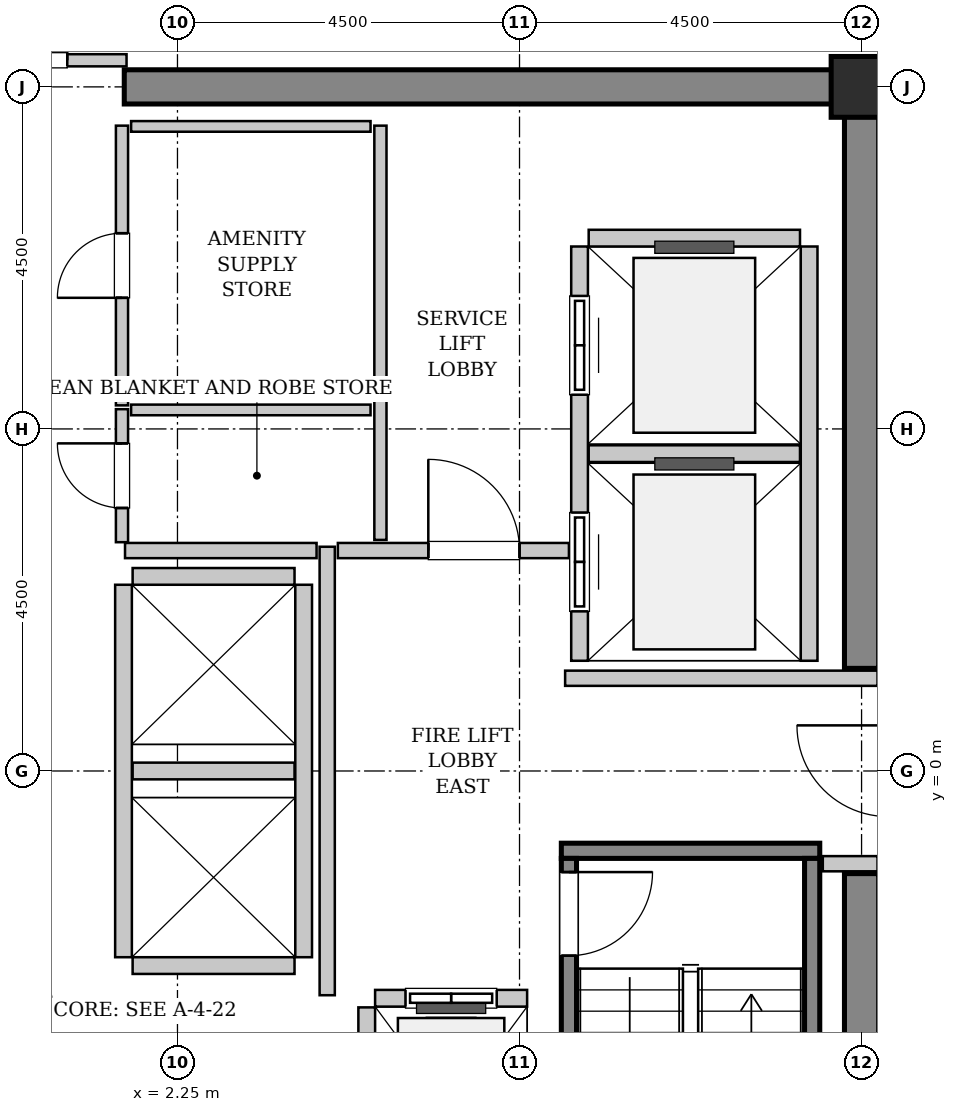
"""IFC4 building model, lengths in metres.
Left out: names, types, materials, properties, quantities, classifications, styles, units other than length and angle.
Written with IfcOpenShell. Run it as: python <this file> out.ifc"""

import sys

from ifc_helpers import new_model, si_unit, direction, frame, frame_2d, origin, origin_2d, place, context, subcontext, project, spatial, rectangle, hollow_rectangle, extrude, source, transform, mapped, element, fill, save


model = new_model("IFC4")
c1 = context("Model", 3, precision=1e-05, world=origin(), true_north=direction((0.0, 1.0)))
c2 = subcontext(c1, "Body", "Model", "MODEL_VIEW")
j1 = project(units=[si_unit("LENGTHUNIT", "METRE"), si_unit("PLANEANGLEUNIT", "RADIAN")], contexts=[c1])
p1 = place(None, origin())
s1 = spatial("IfcSite", under=j1, at=p1, CompositionType="ELEMENT")
p2 = place(p1, origin())
s2 = spatial("IfcBuilding", under=s1, at=p2, CompositionType="ELEMENT")
p3 = place(p2, frame((0.0, 0.0, 279.8)))
s3 = spatial("IfcBuildingStorey", under=s2, at=p3, CompositionType="ELEMENT", Elevation=279.8)
m1 = source(origin(), c2, "Body", "SweptSolid", [
    extrude(rectangle(XDim=9.925, YDim=0.45, at=frame_2d((4.962, 0.0))), origin(), (0.0, 0.0, 1.0), 3.8),
])
p4 = place(p3, frame((1.55, 9.0, 0.0), z_axis=(0.0, 0.0, 1.0), x_axis=(1.0, 0.0, 0.0)))
e1 = element("IfcWall", 1, at=p4, inside=s3, PredefinedType="SHEAR", context=c2, shape_type="MappedRepresentation", body=[
    mapped(m1, transform((0.0, 0.0, 0.0), x_axis=(1.0, 0.0, 0.0), y_axis=(0.0, 1.0, 0.0), z_axis=(0.0, 0.0, 1.0), scale=1.0)),
])
m2 = source(origin(), c2, "Body", "SweptSolid", [
    extrude(rectangle(XDim=7.425, YDim=0.45, at=frame_2d((3.712, 0.0))), origin(), (0.0, 0.0, 1.0), 3.8),
])
for number, where, z_axis, x_axis in (
    (2, (11.25, -8.775, 0.0), (0.0, 0.0, 1.0), (0.0, 1.0, 0.0)),
    (3, (11.25, 1.35, 0.0), (0.0, 0.0, 1.0), (0.0, 1.0, 0.0)),
):
    element("IfcWall", number, at=place(p3, frame(where, z_axis=z_axis, x_axis=x_axis)), inside=s3, PredefinedType="SHEAR", context=c2, shape_type="MappedRepresentation", body=[
        mapped(m2, transform((0.0, 0.0, 0.0), x_axis=(1.0, 0.0, 0.0), y_axis=(0.0, 1.0, 0.0), z_axis=(0.0, 0.0, 1.0), scale=1.0)),
    ])
m3 = source(origin(), c2, "Body", "SweptSolid", [
    extrude(hollow_rectangle(XDim=0.8, YDim=0.8, WallThickness=0.04, InnerFilletRadius=0.04, OuterFilletRadius=0.08, at=origin_2d()), origin(), (0.0, 0.0, 1.0), 3.8),
])
p5 = place(p3, frame((11.25, 9.0, 0.0), z_axis=(0.0, 0.0, 1.0), x_axis=(1.0, 0.0, 0.0)))
e4 = element("IfcColumn", 4, at=p5, inside=s3, PredefinedType="COLUMN", context=c2, shape_type="MappedRepresentation", body=[
    mapped(m3, transform((0.0, 0.0, 0.0), x_axis=(1.0, 0.0, 0.0), y_axis=(0.0, 1.0, 0.0), z_axis=(0.0, 0.0, 1.0), scale=1.0)),
])
m4 = source(origin(), c2, "Body", "SweptSolid", [
    extrude(rectangle(XDim=3.4, YDim=0.2, at=frame_2d((1.7, 0.0))), origin(), (0.0, 0.0, 1.0), 3.8),
])
p6 = place(p3, frame((7.3, -1.05, 0.0), z_axis=(0.0, 0.0, 1.0), x_axis=(1.0, 0.0, 0.0)))
e5 = element("IfcWall", 5, at=p6, inside=s3, PredefinedType="SOLIDWALL", context=c2, shape_type="MappedRepresentation", body=[
    mapped(m4, transform((0.0, 0.0, 0.0), x_axis=(1.0, 0.0, 0.0), y_axis=(0.0, 1.0, 0.0), z_axis=(0.0, 0.0, 1.0), scale=1.0)),
])
m5 = source(origin(), c2, "Body", "SweptSolid", [
    extrude(rectangle(XDim=7.1, YDim=0.2, at=frame_2d((3.55, 0.0))), origin(), (0.0, 0.0, 1.0), 3.8),
])
p7 = place(p3, frame((7.4, -1.15, 0.0), z_axis=(0.0, 0.0, 1.0), x_axis=(0.0, -1.0, 0.0)))
e6 = element("IfcWall", 6, at=p7, inside=s3, PredefinedType="SOLIDWALL", context=c2, shape_type="MappedRepresentation", body=[
    mapped(m5, transform((0.0, 0.0, 0.0), x_axis=(1.0, 0.0, 0.0), y_axis=(0.0, 1.0, 0.0), z_axis=(0.0, 0.0, 1.0), scale=1.0)),
])
p8 = place(p7, frame((0.18, 0.0, 0.0)))
e7 = element("IfcOpeningElement", 7, at=p8, cuts=e6, PredefinedType="OPENING", context=c2, shape_type="SweptSolid", body=[
    extrude(rectangle(XDim=1.1, YDim=2.15, at=frame_2d((0.55, 1.075))), frame((0.0, 0.11, 0.0), z_axis=(0.0, -1.0, 0.0), x_axis=(1.0, 0.0, 0.0)), (0.0, 0.0, 1.0), 0.22),
])
p9 = place(p3, frame((10.6, -1.15, 0.0), z_axis=(0.0, 0.0, 1.0), x_axis=(0.0, -1.0, 0.0)))
e8 = element("IfcWall", 8, at=p9, inside=s3, PredefinedType="SOLIDWALL", context=c2, shape_type="MappedRepresentation", body=[
    mapped(m5, transform((0.0, 0.0, 0.0), x_axis=(1.0, 0.0, 0.0), y_axis=(0.0, 1.0, 0.0), z_axis=(0.0, 0.0, 1.0), scale=1.0)),
])
m6 = source(origin(), c2, "Body", "SweptSolid", [
    extrude(rectangle(XDim=2.0, YDim=0.22, at=frame_2d((1.0, 0.0))), origin(), (0.0, 0.0, 1.0), 3.535),
])
p10 = place(p3, frame((6.85, -2.99, 0.0), z_axis=(0.0, 0.0, 1.0), x_axis=(-1.0, 0.0, 0.0)))
e9 = element("IfcWall", 9, at=p10, inside=s3, PredefinedType="SOLIDWALL", context=c2, shape_type="MappedRepresentation", body=[
    mapped(m6, transform((0.0, 0.0, 0.0), x_axis=(1.0, 0.0, 0.0), y_axis=(0.0, 1.0, 0.0), z_axis=(0.0, 0.0, 1.0), scale=1.0)),
])
p11 = place(p10, frame((0.4, 0.0, 0.0)))
e10 = element("IfcOpeningElement", 10, at=p11, cuts=e9, PredefinedType="OPENING", context=c2, shape_type="SweptSolid", body=[
    extrude(rectangle(XDim=1.2, YDim=2.2, at=frame_2d((0.6, 1.1))), frame((0.0, 0.12, 0.0), z_axis=(0.0, -1.0, 0.0), x_axis=(1.0, 0.0, 0.0)), (0.0, 0.0, 1.0), 0.24),
])
m7 = source(origin(), c2, "Body", "SweptSolid", [
    extrude(rectangle(XDim=2.68, YDim=0.22, at=frame_2d((1.34, 0.0))), origin(), (0.0, 0.0, 1.0), 3.535),
])
p12 = place(p3, frame((4.74, -3.11, 0.0), z_axis=(0.0, 0.0, 1.0), x_axis=(0.0, -1.0, 0.0)))
e11 = element("IfcWall", 11, at=p12, inside=s3, PredefinedType="SOLIDWALL", context=c2, shape_type="MappedRepresentation", body=[
    mapped(m7, transform((0.0, 0.0, 0.0), x_axis=(1.0, 0.0, 0.0), y_axis=(0.0, 1.0, 0.0), z_axis=(0.0, 0.0, 1.0), scale=1.0)),
])
m8 = source(origin(), c2, "Body", "SweptSolid", [
    extrude(rectangle(XDim=5.45, YDim=0.22, at=frame_2d((2.725, 0.0))), origin(), (0.0, 0.0, 1.0), 3.535),
])
p13 = place(p3, frame((7.54, 6.9, 0.0), z_axis=(0.0, 0.0, 1.0), x_axis=(0.0, -1.0, 0.0)))
e12 = element("IfcWall", 12, at=p13, inside=s3, PredefinedType="SOLIDWALL", context=c2, shape_type="MappedRepresentation", body=[
    mapped(m8, transform((0.0, 0.0, 0.0), x_axis=(1.0, 0.0, 0.0), y_axis=(0.0, 1.0, 0.0), z_axis=(0.0, 0.0, 1.0), scale=1.0)),
])
p14 = place(p13, frame((3.5, 0.0, 0.0)))
e13 = element("IfcOpeningElement", 13, at=p14, cuts=e12, PredefinedType="OPENING", context=c2, shape_type="SweptSolid", body=[
    extrude(rectangle(XDim=1.3, YDim=2.3, at=frame_2d((0.65, 1.15))), frame((0.0, 0.12, 0.0), z_axis=(0.0, -1.0, 0.0), x_axis=(1.0, 0.0, 0.0)), (0.0, 0.0, 1.0), 0.24),
])
p15 = place(p13, frame((0.65, 0.0, 0.0)))
e14 = element("IfcOpeningElement", 14, at=p15, cuts=e12, PredefinedType="OPENING", context=c2, shape_type="SweptSolid", body=[
    extrude(rectangle(XDim=1.3, YDim=2.3, at=frame_2d((0.65, 1.15))), frame((0.0, 0.12, 0.0), z_axis=(0.0, -1.0, 0.0), x_axis=(1.0, 0.0, 0.0)), (0.0, 0.0, 1.0), 0.24),
])
p16 = place(p3, frame((10.56, 1.45, 0.0), z_axis=(0.0, 0.0, 1.0), x_axis=(0.0, 1.0, 0.0)))
e15 = element("IfcWall", 15, at=p16, inside=s3, PredefinedType="SOLIDWALL", context=c2, shape_type="MappedRepresentation", body=[
    mapped(m8, transform((0.0, 0.0, 0.0), x_axis=(1.0, 0.0, 0.0), y_axis=(0.0, 1.0, 0.0), z_axis=(0.0, 0.0, 1.0), scale=1.0)),
])
m9 = source(origin(), c2, "Body", "SweptSolid", [
    extrude(rectangle(XDim=2.78, YDim=0.22, at=frame_2d((1.39, 0.0))), origin(), (0.0, 0.0, 1.0), 3.535),
])
for number, where, z_axis, x_axis in (
    (16, (7.66, 4.175, 0.0), (0.0, 0.0, 1.0), (1.0, 0.0, 0.0)),
    (17, (10.44, 7.01, 0.0), (0.0, 0.0, 1.0), (-1.0, 0.0, 0.0)),
):
    element("IfcWall", number, at=place(p3, frame(where, z_axis=z_axis, x_axis=x_axis)), inside=s3, PredefinedType="SOLIDWALL", context=c2, shape_type="MappedRepresentation", body=[
        mapped(m9, transform((0.0, 0.0, 0.0), x_axis=(1.0, 0.0, 0.0), y_axis=(0.0, 1.0, 0.0), z_axis=(0.0, 0.0, 1.0), scale=1.0)),
    ])
m10 = source(origin(), c2, "Body", "SweptSolid", [
    extrude(rectangle(XDim=4.9, YDim=0.22, at=frame_2d((2.45, 0.0))), origin(), (0.0, 0.0, 1.0), 3.535),
])
for number, where, z_axis, x_axis in (
    (18, (1.54, 2.45, 0.0), (0.0, 0.0, 1.0), (0.0, -1.0, 0.0)),
    (19, (3.91, -2.45, 0.0), (0.0, 0.0, 1.0), (0.0, 1.0, 0.0)),
):
    element("IfcWall", number, at=place(p3, frame(where, z_axis=z_axis, x_axis=x_axis)), inside=s3, PredefinedType="SOLIDWALL", context=c2, shape_type="MappedRepresentation", body=[
        mapped(m10, transform((0.0, 0.0, 0.0), x_axis=(1.0, 0.0, 0.0), y_axis=(0.0, 1.0, 0.0), z_axis=(0.0, 0.0, 1.0), scale=1.0)),
    ])
m11 = source(origin(), c2, "Body", "SweptSolid", [
    extrude(rectangle(XDim=2.13, YDim=0.22, at=frame_2d((1.065, 0.0))), origin(), (0.0, 0.0, 1.0), 3.535),
])
for number, where, z_axis, x_axis in (
    (20, (1.66, -2.56, 0.0), (0.0, 0.0, 1.0), (1.0, 0.0, 0.0)),
    (21, (1.66, 0.0, 0.0), (0.0, 0.0, 1.0), (1.0, 0.0, 0.0)),
    (22, (3.79, 2.56, 0.0), (0.0, 0.0, 1.0), (-1.0, 0.0, 0.0)),
):
    element("IfcWall", number, at=place(p3, frame(where, z_axis=z_axis, x_axis=x_axis)), inside=s3, PredefinedType="SOLIDWALL", context=c2, shape_type="MappedRepresentation", body=[
        mapped(m11, transform((0.0, 0.0, 0.0), x_axis=(1.0, 0.0, 0.0), y_axis=(0.0, 1.0, 0.0), z_axis=(0.0, 0.0, 1.0), scale=1.0)),
    ])
m12 = source(origin(), c2, "Body", "SweptSolid", [
    extrude(rectangle(XDim=5.9, YDim=0.2, at=frame_2d((2.95, 0.0))), origin(), (0.0, 0.0, 1.0), 3.535),
])
p17 = place(p3, frame((4.22, -2.95, 0.0), z_axis=(0.0, 0.0, 1.0), x_axis=(0.0, 1.0, 0.0)))
e23 = element("IfcWall", 23, at=p17, inside=s3, PredefinedType="PARTITIONING", context=c2, shape_type="MappedRepresentation", body=[
    mapped(m12, transform((0.0, 0.0, 0.0), x_axis=(1.0, 0.0, 0.0), y_axis=(0.0, 1.0, 0.0), z_axis=(0.0, 0.0, 1.0), scale=1.0)),
])
m13 = source(origin(), c2, "Body", "SweptSolid", [
    extrude(rectangle(XDim=2.52, YDim=0.2, at=frame_2d((1.26, 0.0))), origin(), (0.0, 0.0, 1.0), 3.535),
])
p18 = place(p3, frame((1.56, 2.9, 0.0), z_axis=(0.0, 0.0, 1.0), x_axis=(1.0, 0.0, 0.0)))
e24 = element("IfcWall", 24, at=p18, inside=s3, PredefinedType="PARTITIONING", context=c2, shape_type="MappedRepresentation", body=[
    mapped(m13, transform((0.0, 0.0, 0.0), x_axis=(1.0, 0.0, 0.0), y_axis=(0.0, 1.0, 0.0), z_axis=(0.0, 0.0, 1.0), scale=1.0)),
])
m14 = source(origin(), c2, "Body", "SweptSolid", [
    extrude(rectangle(XDim=3.04, YDim=0.2, at=frame_2d((1.52, 0.0))), origin(), (0.0, 0.0, 1.0), 3.535),
])
p19 = place(p3, frame((4.36, 2.9, 0.0), z_axis=(0.0, 0.0, 1.0), x_axis=(1.0, 0.0, 0.0)))
e25 = element("IfcWall", 25, at=p19, inside=s3, PredefinedType="PARTITIONING", context=c2, shape_type="MappedRepresentation", body=[
    mapped(m14, transform((0.0, 0.0, 0.0), x_axis=(1.0, 0.0, 0.0), y_axis=(0.0, 1.0, 0.0), z_axis=(0.0, 0.0, 1.0), scale=1.0)),
])
p20 = place(p19, frame((1.19, 0.0, 0.0)))
e26 = element("IfcOpeningElement", 26, at=p20, cuts=e25, PredefinedType="OPENING", context=c2, shape_type="SweptSolid", body=[
    extrude(rectangle(XDim=1.2, YDim=2.15, at=frame_2d((0.6, 1.075))), frame((0.0, 0.11, 0.0), z_axis=(0.0, -1.0, 0.0), x_axis=(1.0, 0.0, 0.0)), (0.0, 0.0, 1.0), 0.22),
])
m15 = source(origin(), c2, "Body", "SweptSolid", [
    extrude(rectangle(XDim=4.11, YDim=0.2, at=frame_2d((2.055, 0.0))), origin(), (0.0, 0.0, 1.0), 3.535),
])
p21 = place(p3, frame((7.35, 1.22, 0.0), z_axis=(0.0, 0.0, 1.0), x_axis=(1.0, 0.0, 0.0)))
e27 = element("IfcWall", 27, at=p21, inside=s3, PredefinedType="PARTITIONING", context=c2, shape_type="MappedRepresentation", body=[
    mapped(m15, transform((0.0, 0.0, 0.0), x_axis=(1.0, 0.0, 0.0), y_axis=(0.0, 1.0, 0.0), z_axis=(0.0, 0.0, 1.0), scale=1.0)),
])
m16 = source(origin(), c2, "Body", "SweptSolid", [
    extrude(rectangle(XDim=0.72, YDim=0.2, at=frame_2d((0.36, 0.0))), origin(), (0.0, 0.0, 1.0), 3.535),
])
p22 = place(p3, frame((10.74, -1.22, 0.0), z_axis=(0.0, 0.0, 1.0), x_axis=(1.0, 0.0, 0.0)))
e28 = element("IfcWall", 28, at=p22, inside=s3, PredefinedType="PARTITIONING", context=c2, shape_type="MappedRepresentation", body=[
    mapped(m16, transform((0.0, 0.0, 0.0), x_axis=(1.0, 0.0, 0.0), y_axis=(0.0, 1.0, 0.0), z_axis=(0.0, 0.0, 1.0), scale=1.0)),
])
m17 = source(origin(), c2, "Body", "SweptSolid", [
    extrude(rectangle(XDim=3.16, YDim=0.16, at=frame_2d((1.58, 0.0))), origin(), (0.0, 0.0, 1.0), 2.625),
])
p23 = place(p3, frame((-1.58, 9.35, 0.0), z_axis=(0.0, 0.0, 1.0), x_axis=(1.0, 0.0, 0.0)))
e29 = element("IfcWall", 29, at=p23, inside=s3, PredefinedType="PARTITIONING", context=c2, shape_type="MappedRepresentation", body=[
    mapped(m17, transform((0.0, 0.0, 0.0), x_axis=(1.0, 0.0, 0.0), y_axis=(0.0, 1.0, 0.0), z_axis=(0.0, 0.0, 1.0), scale=1.0)),
])
p24 = place(p23, frame((0.78, 0.0, 0.0)))
e30 = element("IfcOpeningElement", 30, at=p24, cuts=e29, PredefinedType="OPENING", context=c2, shape_type="SweptSolid", body=[
    extrude(rectangle(XDim=1.6, YDim=2.3, at=frame_2d((0.8, 1.15))), frame((0.0, 0.09, 0.0), z_axis=(0.0, -1.0, 0.0), x_axis=(1.0, 0.0, 0.0)), (0.0, 0.0, 1.0), 0.18),
])
m18 = source(origin(), c2, "Body", "SweptSolid", [
    extrude(rectangle(XDim=5.45, YDim=0.16, at=frame_2d((2.725, 0.0))), origin(), (0.0, 0.0, 1.0), 3.535),
])
p25 = place(p3, frame((4.92, 3.04, 0.0), z_axis=(0.0, 0.0, 1.0), x_axis=(0.0, 1.0, 0.0)))
e31 = element("IfcWall", 31, at=p25, inside=s3, PredefinedType="PARTITIONING", context=c2, shape_type="MappedRepresentation", body=[
    mapped(m18, transform((0.0, 0.0, 0.0), x_axis=(1.0, 0.0, 0.0), y_axis=(0.0, 1.0, 0.0), z_axis=(0.0, 0.0, 1.0), scale=1.0)),
])
m19 = source(origin(), c2, "Body", "SweptSolid", [
    extrude(rectangle(XDim=1.75, YDim=0.16, at=frame_2d((0.875, 0.0))), origin(), (0.0, 0.0, 1.0), 3.535),
])
p26 = place(p3, frame((1.52, 3.01, 0.0), z_axis=(0.0, 0.0, 1.0), x_axis=(0.0, 1.0, 0.0)))
e32 = element("IfcWall", 32, at=p26, inside=s3, PredefinedType="PARTITIONING", context=c2, shape_type="MappedRepresentation", body=[
    mapped(m19, transform((0.0, 0.0, 0.0), x_axis=(1.0, 0.0, 0.0), y_axis=(0.0, 1.0, 0.0), z_axis=(0.0, 0.0, 1.0), scale=1.0)),
])
p27 = place(p26, frame((0.45, 0.0, 0.0)))
e33 = element("IfcOpeningElement", 33, at=p27, cuts=e32, PredefinedType="OPENING", context=c2, shape_type="SweptSolid", body=[
    extrude(rectangle(XDim=0.85, YDim=2.1, at=frame_2d((0.425, 1.05))), frame((0.0, 0.09, 0.0), z_axis=(0.0, -1.0, 0.0), x_axis=(1.0, 0.0, 0.0)), (0.0, 0.0, 1.0), 0.18),
])
m20 = source(origin(), c2, "Body", "SweptSolid", [
    extrude(rectangle(XDim=3.15, YDim=0.14, at=frame_2d((1.575, 0.0))), origin(), (0.0, 0.0, 1.0), 3.535),
])
p28 = place(p3, frame((1.64, 4.75, 0.0), z_axis=(0.0, 0.0, 1.0), x_axis=(1.0, 0.0, 0.0)))
e34 = element("IfcWall", 34, at=p28, inside=s3, PredefinedType="PARTITIONING", context=c2, shape_type="MappedRepresentation", body=[
    mapped(m20, transform((0.0, 0.0, 0.0), x_axis=(1.0, 0.0, 0.0), y_axis=(0.0, 1.0, 0.0), z_axis=(0.0, 0.0, 1.0), scale=1.0)),
])
m21 = source(origin(), c2, "Body", "SweptSolid", [
    extrude(rectangle(XDim=3.68, YDim=0.16, at=frame_2d((1.84, 0.0))), origin(), (0.0, 0.0, 1.0), 3.535),
])
p29 = place(p3, frame((1.52, 4.81, 0.0), z_axis=(0.0, 0.0, 1.0), x_axis=(0.0, 1.0, 0.0)))
e35 = element("IfcWall", 35, at=p29, inside=s3, PredefinedType="PARTITIONING", context=c2, shape_type="MappedRepresentation", body=[
    mapped(m21, transform((0.0, 0.0, 0.0), x_axis=(1.0, 0.0, 0.0), y_axis=(0.0, 1.0, 0.0), z_axis=(0.0, 0.0, 1.0), scale=1.0)),
])
p30 = place(p29, frame((1.415, 0.0, 0.0)))
e36 = element("IfcOpeningElement", 36, at=p30, cuts=e35, PredefinedType="OPENING", context=c2, shape_type="SweptSolid", body=[
    extrude(rectangle(XDim=0.85, YDim=2.1, at=frame_2d((0.425, 1.05))), frame((0.0, 0.09, 0.0), z_axis=(0.0, -1.0, 0.0), x_axis=(1.0, 0.0, 0.0)), (0.0, 0.0, 1.0), 0.18),
])
p31 = place(p3, frame((1.64, 8.48, 0.0), z_axis=(0.0, 0.0, 1.0), x_axis=(1.0, 0.0, 0.0)))
e37 = element("IfcWall", 37, at=p31, inside=s3, PredefinedType="PARTITIONING", context=c2, shape_type="MappedRepresentation", body=[
    mapped(m20, transform((0.0, 0.0, 0.0), x_axis=(1.0, 0.0, 0.0), y_axis=(0.0, 1.0, 0.0), z_axis=(0.0, 0.0, 1.0), scale=1.0)),
])
m22 = source(origin(), c2, "Body", "SweptSolid", [
    extrude(rectangle(XDim=1.1, YDim=2.15, at=frame_2d((0.55, 1.075))), frame((0.0, 0.025, 0.0), z_axis=(0.0, -1.0, 0.0), x_axis=(1.0, 0.0, 0.0)), (0.0, 0.0, 1.0), 0.05),
])
p32 = place(p8, origin())
e38 = element("IfcDoor", 38, at=p32, inside=s3, OperationType="SINGLE_SWING_LEFT", PredefinedType="DOOR", context=c2, shape_type="MappedRepresentation", body=[
    mapped(m22, transform((0.0, 0.0, 0.0), x_axis=(1.0, 0.0, 0.0), y_axis=(0.0, 1.0, 0.0), z_axis=(0.0, 0.0, 1.0), scale=1.0)),
])
fill(e7, e38)
m23 = source(origin(), c2, "Body", "SweptSolid", [
    extrude(rectangle(XDim=1.2, YDim=2.2, at=frame_2d((0.6, 1.1))), frame((0.0, 0.025, 0.0), z_axis=(0.0, -1.0, 0.0), x_axis=(1.0, 0.0, 0.0)), (0.0, 0.0, 1.0), 0.05),
])
p33 = place(p11, origin())
e39 = element("IfcDoor", 39, at=p33, inside=s3, OperationType="SLIDING_TO_LEFT", PredefinedType="DOOR", context=c2, shape_type="MappedRepresentation", body=[
    mapped(m23, transform((0.0, 0.0, 0.0), x_axis=(1.0, 0.0, 0.0), y_axis=(0.0, 1.0, 0.0), z_axis=(0.0, 0.0, 1.0), scale=1.0)),
])
fill(e10, e39)
m24 = source(origin(), c2, "Body", "SweptSolid", [
    extrude(rectangle(XDim=1.3, YDim=2.3, at=frame_2d((0.65, 1.15))), frame((0.0, 0.025, 0.0), z_axis=(0.0, -1.0, 0.0), x_axis=(1.0, 0.0, 0.0)), (0.0, 0.0, 1.0), 0.05),
])
p34 = place(p14, origin())
e40 = element("IfcDoor", 40, at=p34, inside=s3, OperationType="SLIDING_TO_RIGHT", PredefinedType="DOOR", context=c2, shape_type="MappedRepresentation", body=[
    mapped(m24, transform((0.0, 0.0, 0.0), x_axis=(1.0, 0.0, 0.0), y_axis=(0.0, 1.0, 0.0), z_axis=(0.0, 0.0, 1.0), scale=1.0)),
])
fill(e13, e40)
p35 = place(p15, origin())
e41 = element("IfcDoor", 41, at=p35, inside=s3, OperationType="SLIDING_TO_RIGHT", PredefinedType="DOOR", context=c2, shape_type="MappedRepresentation", body=[
    mapped(m24, transform((0.0, 0.0, 0.0), x_axis=(1.0, 0.0, 0.0), y_axis=(0.0, 1.0, 0.0), z_axis=(0.0, 0.0, 1.0), scale=1.0)),
])
fill(e14, e41)
m25 = source(origin(), c2, "Body", "SweptSolid", [
    extrude(rectangle(XDim=1.2, YDim=2.15, at=frame_2d((0.6, 1.075))), frame((0.0, 0.025, 0.0), z_axis=(0.0, -1.0, 0.0), x_axis=(1.0, 0.0, 0.0)), (0.0, 0.0, 1.0), 0.05),
])
p36 = place(p20, origin())
e42 = element("IfcDoor", 42, at=p36, inside=s3, OperationType="SINGLE_SWING_LEFT", PredefinedType="DOOR", context=c2, shape_type="MappedRepresentation", body=[
    mapped(m25, transform((0.0, 0.0, 0.0), x_axis=(1.0, 0.0, 0.0), y_axis=(0.0, 1.0, 0.0), z_axis=(0.0, 0.0, 1.0), scale=1.0)),
])
fill(e26, e42)
m26 = source(origin(), c2, "Body", "SweptSolid", [
    extrude(rectangle(XDim=1.6, YDim=2.3, at=frame_2d((0.8, 1.15))), frame((0.0, 0.025, 0.0), z_axis=(0.0, -1.0, 0.0), x_axis=(1.0, 0.0, 0.0)), (0.0, 0.0, 1.0), 0.05),
])
p37 = place(p24, origin())
e43 = element("IfcDoor", 43, at=p37, inside=s3, OperationType="DOUBLE_DOOR_SINGLE_SWING", PredefinedType="DOOR", context=c2, shape_type="MappedRepresentation", body=[
    mapped(m26, transform((0.0, 0.0, 0.0), x_axis=(1.0, 0.0, 0.0), y_axis=(0.0, 1.0, 0.0), z_axis=(0.0, 0.0, 1.0), scale=1.0)),
])
fill(e30, e43)
m27 = source(origin(), c2, "Body", "SweptSolid", [
    extrude(rectangle(XDim=0.85, YDim=2.1, at=frame_2d((0.425, 1.05))), frame((0.0, 0.025, 0.0), z_axis=(0.0, -1.0, 0.0), x_axis=(1.0, 0.0, 0.0)), (0.0, 0.0, 1.0), 0.05),
])
p38 = place(p27, origin())
e44 = element("IfcDoor", 44, at=p38, inside=s3, OperationType="SINGLE_SWING_RIGHT", PredefinedType="DOOR", context=c2, shape_type="MappedRepresentation", body=[
    mapped(m27, transform((0.0, 0.0, 0.0), x_axis=(1.0, 0.0, 0.0), y_axis=(0.0, 1.0, 0.0), z_axis=(0.0, 0.0, 1.0), scale=1.0)),
])
fill(e33, e44)
p39 = place(p30, origin())
e45 = element("IfcDoor", 45, at=p39, inside=s3, OperationType="SINGLE_SWING_LEFT", PredefinedType="DOOR", context=c2, shape_type="MappedRepresentation", body=[
    mapped(m27, transform((0.0, 0.0, 0.0), x_axis=(1.0, 0.0, 0.0), y_axis=(0.0, 1.0, 0.0), z_axis=(0.0, 0.0, 1.0), scale=1.0)),
])
fill(e36, e45)
save(model, sys.argv[1])
